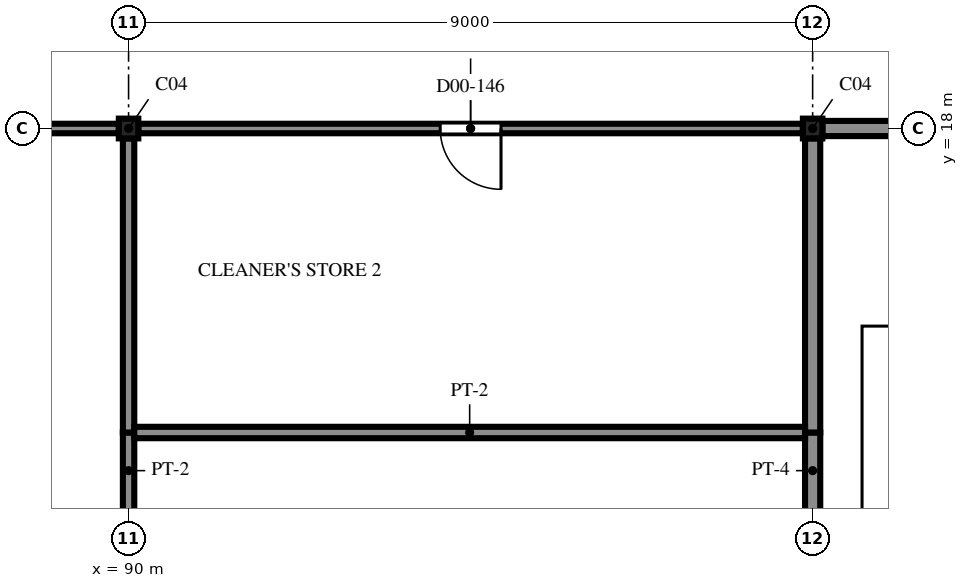
"""IFC4 building model, lengths in metres.
Left out: names, types, materials, properties, quantities, classifications, styles, units other than length and angle.
Written with IfcOpenShell. Run it as: python <this file> out.ifc"""

import sys

from ifc_helpers import new_model, si_unit, direction, frame, frame_2d, origin, origin_2d, place, context, subcontext, project, spatial, polyline, rectangle, i_section, outline, extrude, element, fill, save


model = new_model("IFC4")
c1 = context("Model", 3, precision=1e-05, world=origin(), true_north=direction((0.0, 1.0)))
c2 = subcontext(c1, "Body", "Model", "MODEL_VIEW")
j1 = project(units=[si_unit("LENGTHUNIT", "METRE"), si_unit("PLANEANGLEUNIT", "RADIAN")], contexts=[c1])
p1 = place(None, origin())
s1 = spatial("IfcSite", under=j1, at=p1, CompositionType="ELEMENT")
p2 = place(p1, origin())
s2 = spatial("IfcBuilding", under=s1, at=p2, CompositionType="ELEMENT")
p3 = place(p2, origin())
s3 = spatial("IfcBuildingStorey", under=s2, at=p3, CompositionType="ELEMENT", Elevation=0.0)
for number, where, z_axis, x_axis in (
    (1, (90.0, 18.0, -2.1), (0.0, 0.0, 1.0), (1.0, 0.0, 0.0)),
    (2, (99.0, 18.0, -2.1), (0.0, 0.0, 1.0), (1.0, 0.0, 0.0)),
):
    element("IfcColumn", number, at=place(p3, frame(where, z_axis=z_axis, x_axis=x_axis)), inside=s3, PredefinedType="COLUMN", context=c2, shape_type="SweptSolid", body=[
        extrude(i_section(OverallWidth=0.256, OverallDepth=0.26, WebThickness=0.01, FlangeThickness=0.017, FilletRadius=0.013, at=origin_2d()), origin(), (0.0, 0.0, 1.0), 9.6),
    ])
p4 = place(p3, frame((89.872, 18.0, 0.0), z_axis=(0.0, 0.0, 1.0), x_axis=(-1.0, 0.0, 0.0)))
e3 = element("IfcWall", 3, at=p4, inside=s3, PredefinedType="PARTITIONING", context=c2, shape_type="SweptSolid", body=[
    extrude(rectangle(XDim=8.744, YDim=0.125, at=frame_2d((4.372, 0.0))), origin(), (0.0, 0.0, 1.0), 6.757),
])
p5 = place(p3, frame((107.872, 18.0, 0.0), z_axis=(0.0, 0.0, 1.0), x_axis=(-1.0, 0.0, 0.0)))
e4 = element("IfcWall", 4, at=p5, inside=s3, PredefinedType="PARTITIONING", context=c2, shape_type="SweptSolid", body=[
    extrude(rectangle(XDim=8.744, YDim=0.2, at=frame_2d((4.372, 0.0))), origin(), (0.0, 0.0, 1.0), 6.6),
])
p6 = place(p5, frame((3.472, 0.0, 0.0)))
e5 = element("IfcOpeningElement", 5, at=p6, cuts=e4, PredefinedType="OPENING", context=c2, shape_type="SweptSolid", body=[
    extrude(rectangle(XDim=1.8, YDim=2.4, at=frame_2d((0.9, 1.2))), frame((0.0, 0.11, 0.0), z_axis=(0.0, -1.0, 0.0), x_axis=(1.0, 0.0, 0.0)), (0.0, 0.0, 1.0), 0.22),
])
p7 = place(p3, frame((98.872, 18.0, 0.0), z_axis=(0.0, 0.0, 1.0), x_axis=(-1.0, 0.0, 0.0)))
e6 = element("IfcWall", 6, at=p7, inside=s3, PredefinedType="PARTITIONING", context=c2, shape_type="SweptSolid", body=[
    extrude(rectangle(XDim=8.744, YDim=0.125, at=frame_2d((4.372, 0.0))), origin(), (0.0, 0.0, 1.0), 6.757),
])
p8 = place(p7, frame((3.972, 0.0, 0.0)))
e7 = element("IfcOpeningElement", 7, at=p8, cuts=e6, PredefinedType="OPENING", context=c2, shape_type="SweptSolid", body=[
    extrude(rectangle(XDim=0.8, YDim=2.1, at=frame_2d((0.4, 1.05))), frame((0.0, 0.073, 0.0), z_axis=(0.0, -1.0, 0.0), x_axis=(1.0, 0.0, 0.0)), (0.0, 0.0, 1.0), 0.145),
])
p9 = place(p3, frame((99.0, 9.127, 0.0), z_axis=(0.0, 0.0, 1.0), x_axis=(0.0, 1.0, 0.0)))
e8 = element("IfcWall", 8, at=p9, inside=s3, PredefinedType="PARTITIONING", context=c2, shape_type="SweptSolid", body=[
    extrude(rectangle(XDim=4.873, YDim=0.2, at=frame_2d((2.437, 0.0))), origin(), (0.0, 0.0, 1.0), 6.6),
])
p10 = place(p3, frame((99.0, 14.0, 0.0), z_axis=(0.0, 0.0, 1.0), x_axis=(0.0, 1.0, 0.0)))
e9 = element("IfcWall", 9, at=p10, inside=s3, PredefinedType="PARTITIONING", context=c2, shape_type="SweptSolid", body=[
    extrude(rectangle(XDim=3.87, YDim=0.2, at=frame_2d((1.935, 0.0))), origin(), (0.0, 0.0, 1.0), 6.6),
])
p11 = place(p3, frame((90.0, 14.0, 0.0), z_axis=(0.0, 0.0, 1.0), x_axis=(0.0, -1.0, 0.0)))
e10 = element("IfcWall", 10, at=p11, inside=s3, PredefinedType="PARTITIONING", context=c2, shape_type="SweptSolid", body=[
    extrude(rectangle(XDim=4.873, YDim=0.15, at=frame_2d((2.437, 0.0))), origin(), (0.0, 0.0, 1.0), 6.6),
])
p12 = place(p3, frame((90.0, 17.87, 0.0), z_axis=(0.0, 0.0, 1.0), x_axis=(0.0, -1.0, 0.0)))
e11 = element("IfcWall", 11, at=p12, inside=s3, PredefinedType="PARTITIONING", context=c2, shape_type="SweptSolid", body=[
    extrude(rectangle(XDim=3.87, YDim=0.15, at=frame_2d((1.935, 0.0))), origin(), (0.0, 0.0, 1.0), 6.6),
])
p13 = place(p3, frame((90.075, 14.0, 0.0), z_axis=(0.0, 0.0, 1.0), x_axis=(1.0, 0.0, 0.0)))
e12 = element("IfcWall", 12, at=p13, inside=s3, PredefinedType="PARTITIONING", context=c2, shape_type="SweptSolid", body=[
    extrude(rectangle(XDim=8.825, YDim=0.15, at=frame_2d((4.413, 0.0))), origin(), (0.0, 0.0, 1.0), 6.6),
])
p14 = place(p8, origin())
e13 = element("IfcDoor", 13, at=p14, inside=s3, OperationType="SINGLE_SWING_LEFT", PredefinedType="DOOR", context=c2, shape_type="SweptSolid", body=[
    extrude(outline(polyline([(0.0, 0.0), (0.07, 0.0), (0.07, 2.03), (0.73, 2.03), (0.73, 0.0), (0.8, 0.0), (0.8, 2.1), (0.0, 2.1), (0.0, 0.0)])), frame((0.0, 0.025, 0.0), z_axis=(0.0, -1.0, 0.0), x_axis=(1.0, 0.0, 0.0)), (0.0, 0.0, 1.0), 0.05),
    extrude(outline(polyline([(0.074, 0.01), (0.726, 0.01), (0.726, 2.026), (0.074, 2.026), (0.074, 0.01)]), holes=[polyline([(0.194, 0.16), (0.606, 0.16), (0.606, 1.01), (0.194, 1.01), (0.194, 0.16)]), polyline([(0.25, 1.16), (0.55, 1.16), (0.55, 1.76), (0.25, 1.76), (0.25, 1.16)])]), frame((0.0, 0.017, 0.0), z_axis=(0.0, -1.0, 0.0), x_axis=(1.0, 0.0, 0.0)), (0.0, 0.0, 1.0), 0.035),
    extrude(rectangle(XDim=0.412, YDim=0.85, at=frame_2d((0.4, 0.585))), frame((0.0, 0.009, 0.0), z_axis=(0.0, -1.0, 0.0), x_axis=(1.0, 0.0, 0.0)), (0.0, 0.0, 1.0), 0.017),
    extrude(rectangle(XDim=0.3, YDim=0.6, at=frame_2d((0.4, 1.46))), frame((0.0, 0.006, 0.0), z_axis=(0.0, -1.0, 0.0), x_axis=(1.0, 0.0, 0.0)), (0.0, 0.0, 1.0), 0.012),
])
fill(e7, e13)
save(model, sys.argv[1])
